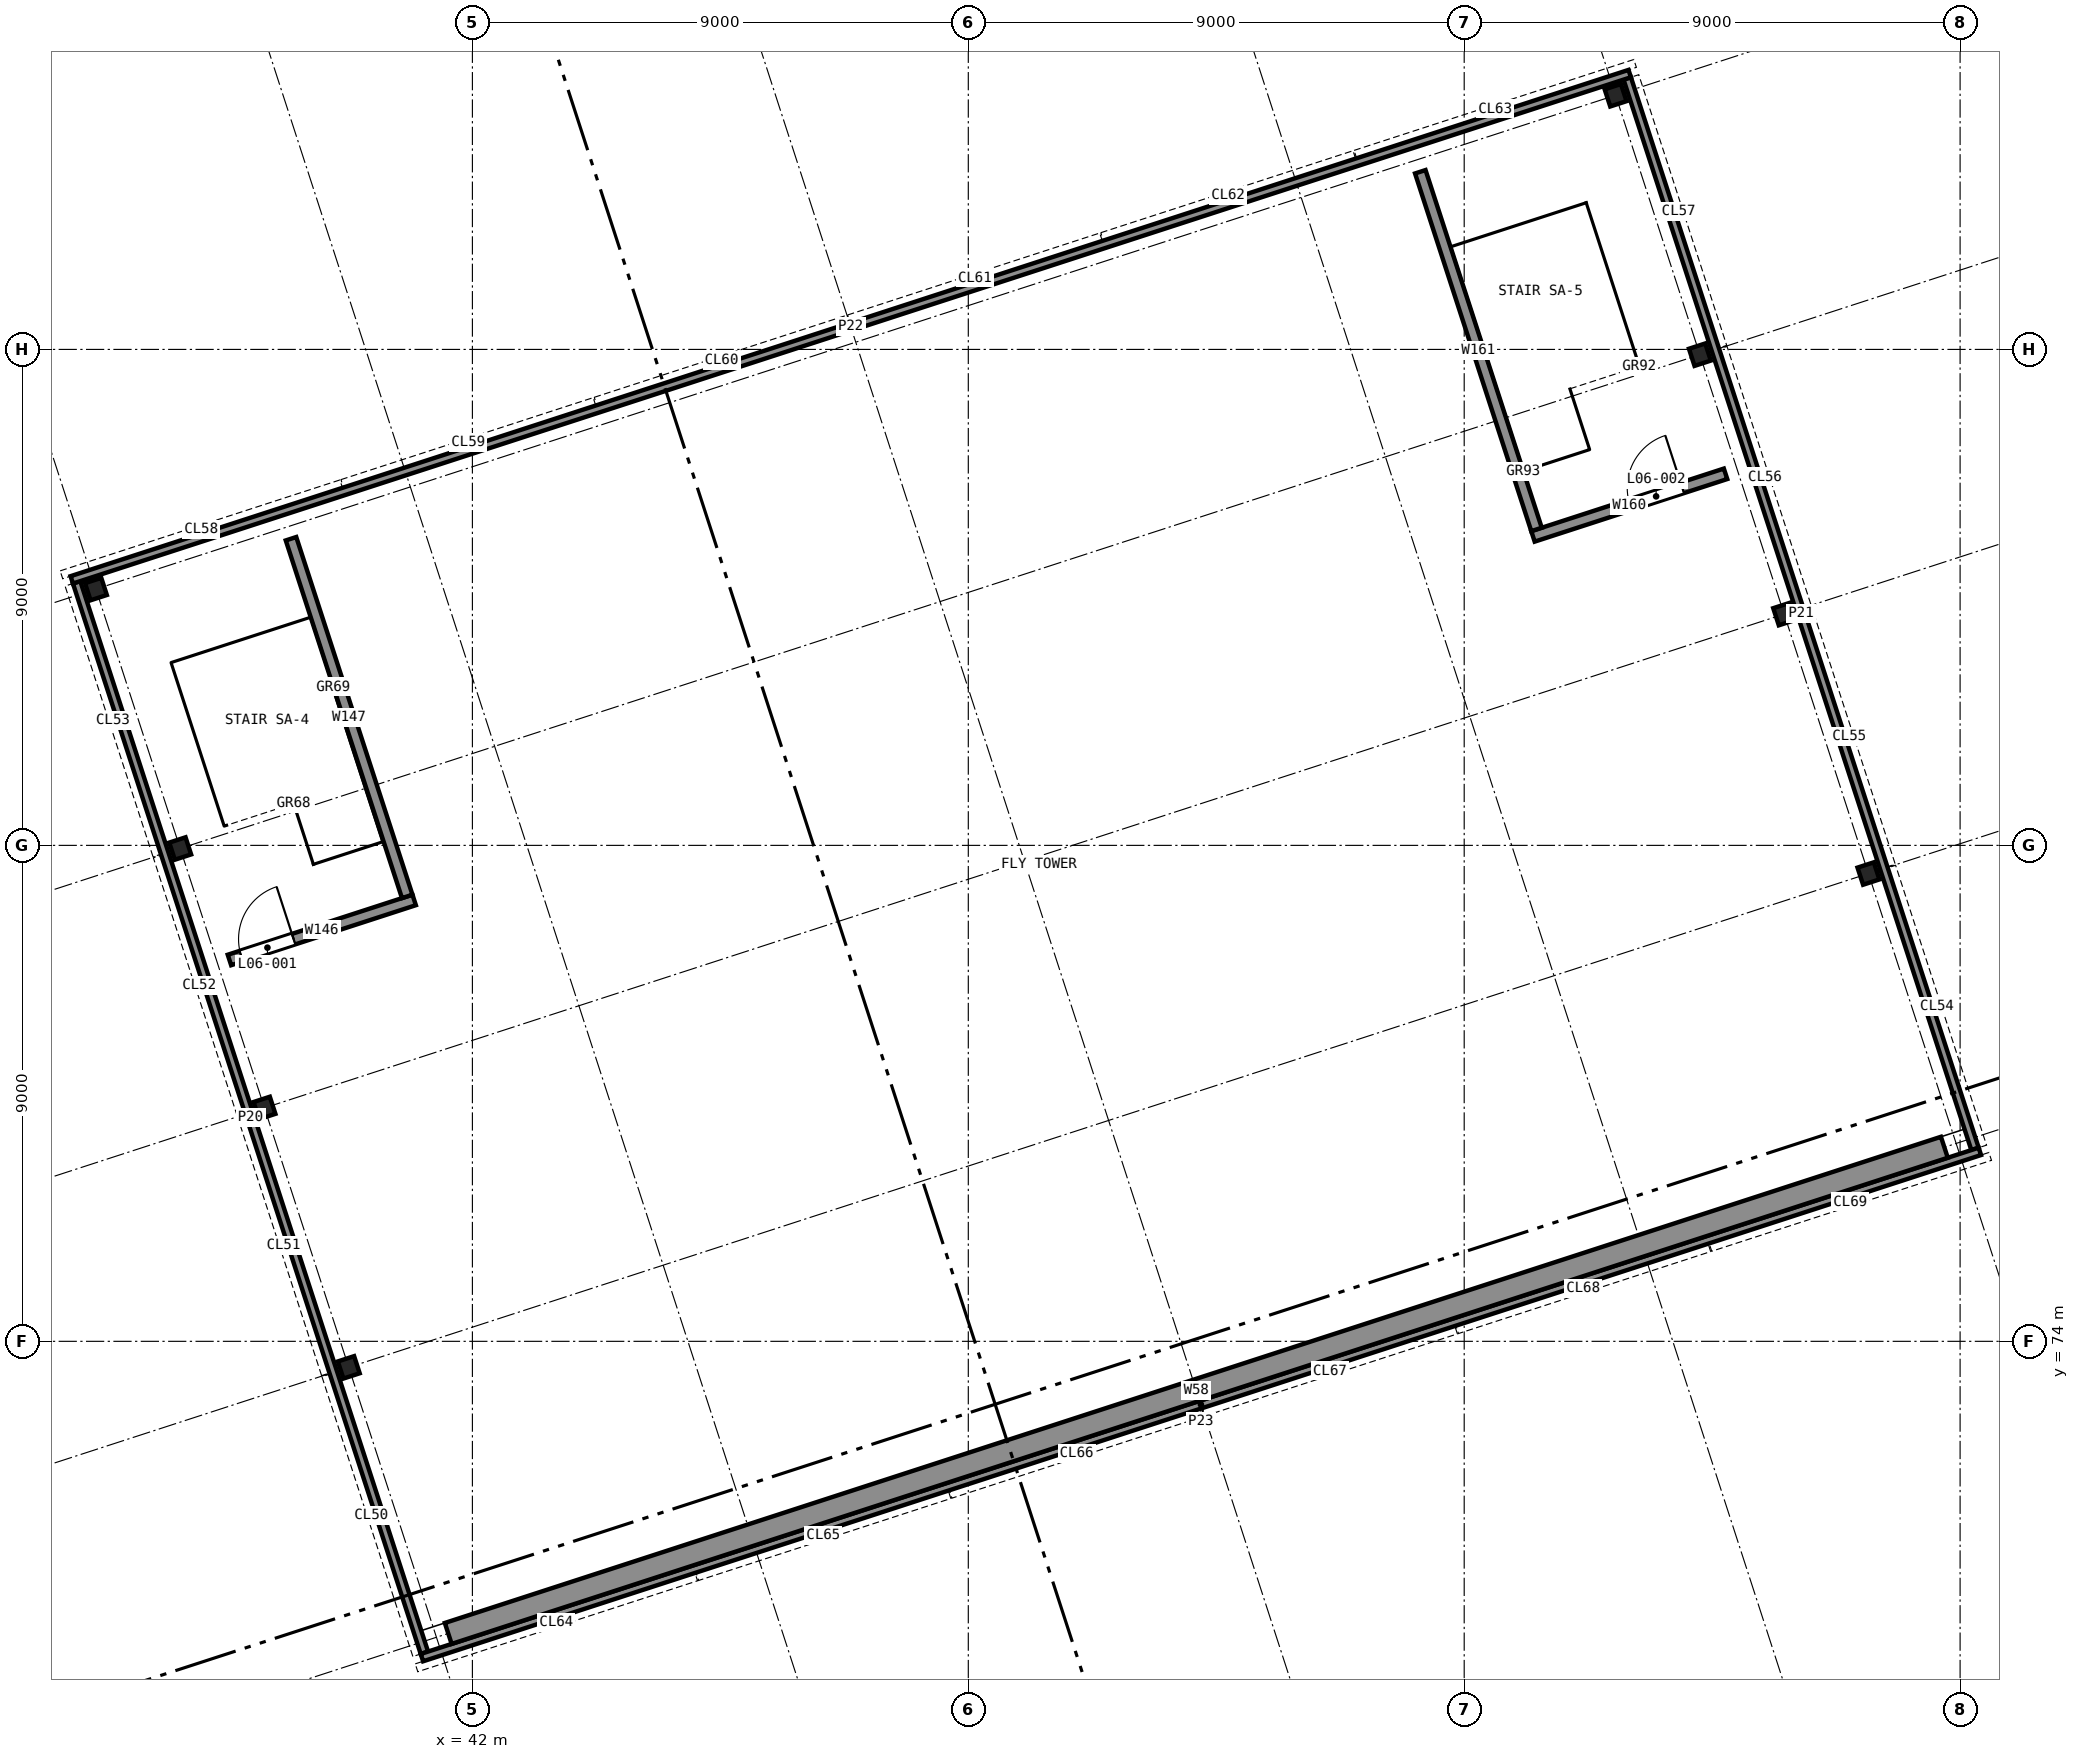
"""IFC4 building model, lengths in metres.
Left out: names, types, materials, properties, quantities, classifications, styles, units other than length and angle.
Written with IfcOpenShell. Run it as: python <this file> out.ifc"""

import sys

from ifc_helpers import new_model, si_unit, direction, frame, frame_2d, origin, origin_2d, place, context, subcontext, project, spatial, rectangle, i_section, extrude, element, fill, save


model = new_model("IFC4")
c1 = context("Model", 3, precision=1e-05, world=origin(), true_north=direction((0.0, 1.0)))
c2 = subcontext(c1, "Body", "Model", "MODEL_VIEW")
j1 = project(units=[si_unit("LENGTHUNIT", "METRE"), si_unit("PLANEANGLEUNIT", "RADIAN")], contexts=[c1])
p1 = place(None, origin())
s1 = spatial("IfcSite", under=j1, at=p1, CompositionType="ELEMENT")
p2 = place(p1, origin())
s2 = spatial("IfcBuilding", under=s1, at=p2, CompositionType="ELEMENT")
p3 = place(p2, frame((0.0, 0.0, 25.5)))
s3 = spatial("IfcBuildingStorey", under=s2, at=p3, CompositionType="ELEMENT", Elevation=25.5)
p4 = place(p3, frame((41.562, 68.699, 0.0), z_axis=(0.0, 0.0, 1.0), x_axis=(0.951058008754, 0.309012401021, 0.0)))
e1 = element("IfcWall", 1, at=p4, inside=s3, PredefinedType="SHEAR", context=c2, shape_type="SweptSolid", body=[
    extrude(rectangle(XDim=28.55, YDim=0.4, at=frame_2d((14.275, 0.0))), origin(), (0.0, 0.0, 1.0), 4.0),
])
p5 = place(p3, frame((37.591, 80.92, 0.0), z_axis=(0.0, 0.0, 1.0), x_axis=(0.951052389726, 0.30902969436, 0.0)))
e2 = element("IfcWall", 2, at=p5, inside=s3, PredefinedType="SOLIDWALL", context=c2, shape_type="SweptSolid", body=[
    extrude(rectangle(XDim=3.525, YDim=0.2, at=frame_2d((1.763, 0.0))), origin(), (0.0, 0.0, 1.0), 4.0),
])
p6 = place(p5, frame((0.225, 0.0, 0.0)))
e3 = element("IfcOpeningElement", 3, at=p6, cuts=e2, PredefinedType="OPENING", context=c2, shape_type="SweptSolid", body=[
    extrude(rectangle(XDim=1.0, YDim=2.1, at=frame_2d((0.5, 1.05))), frame((0.0, 0.11, 0.0), z_axis=(0.0, -1.0, 0.0), x_axis=(1.0, 0.0, 0.0)), (0.0, 0.0, 1.0), 0.22),
])
p7 = place(p3, frame((40.817, 82.074, 0.0), z_axis=(0.0, 0.0, 1.0), x_axis=(-0.309028643499, 0.951052731186, 0.0)))
e4 = element("IfcWall", 4, at=p7, inside=s3, PredefinedType="SOLIDWALL", context=c2, shape_type="SweptSolid", body=[
    extrude(rectangle(XDim=6.825, YDim=0.2, at=frame_2d((3.413, 0.0))), origin(), (0.0, 0.0, 1.0), 4.0),
])
p8 = place(p3, frame((64.743, 89.743, 0.0), z_axis=(0.0, 0.0, 1.0), x_axis=(-0.95104773735, -0.309044011885, 0.0)))
e5 = element("IfcWall", 5, at=p8, inside=s3, PredefinedType="SOLIDWALL", context=c2, shape_type="SweptSolid", body=[
    extrude(rectangle(XDim=3.675, YDim=0.2, at=frame_2d((1.837, 0.0))), origin(), (0.0, 0.0, 1.0), 4.0),
])
p9 = place(p8, frame((0.825, 0.0, 0.0)))
e6 = element("IfcOpeningElement", 6, at=p9, cuts=e5, PredefinedType="OPENING", context=c2, shape_type="SweptSolid", body=[
    extrude(rectangle(XDim=1.0, YDim=2.1, at=frame_2d((0.5, 1.05))), frame((0.0, 0.11, 0.0), z_axis=(0.0, -1.0, 0.0), x_axis=(1.0, 0.0, 0.0)), (0.0, 0.0, 1.0), 0.22),
])
p10 = place(p3, frame((61.312, 88.733, 0.0), z_axis=(0.0, 0.0, 1.0), x_axis=(-0.309028643499, 0.951052731186, 0.0)))
e7 = element("IfcWall", 7, at=p10, inside=s3, PredefinedType="SOLIDWALL", context=c2, shape_type="SweptSolid", body=[
    extrude(rectangle(XDim=6.825, YDim=0.2, at=frame_2d((3.413, 0.0))), origin(), (0.0, 0.0, 1.0), 4.0),
])
for number, where, z_axis, x_axis in (
    (8, (39.756, 73.528, 0.0), (0.0, 0.0, 1.0), (0.951, 0.309, 0.0)),
    (9, (67.337, 82.489, 0.0), (0.0, 0.0, 1.0), (0.951, 0.309, 0.0)),
    (10, (38.227, 78.235, 0.0), (0.0, 0.0, 1.0), (0.951, 0.309, 0.0)),
    (11, (65.807, 87.197, 0.0), (0.0, 0.0, 1.0), (0.951, 0.309, 0.0)),
    (12, (36.697, 82.943, 0.0), (0.0, 0.0, 1.0), (0.951, 0.309, 0.0)),
    (13, (64.277, 91.905, 0.0), (0.0, 0.0, 1.0), (0.951, 0.309, 0.0)),
    (14, (35.167, 87.651, 0.0), (0.0, 0.0, 1.0), (0.951, 0.309, 0.0)),
    (15, (62.748, 96.612, 0.0), (0.0, 0.0, 1.0), (0.951, 0.309, 0.0)),
):
    element("IfcColumn", number, at=place(p3, frame(where, z_axis=z_axis, x_axis=x_axis)), inside=s3, PredefinedType="COLUMN", context=c2, shape_type="SweptSolid", body=[
        extrude(i_section(OverallWidth=0.311, OverallDepth=0.327, WebThickness=0.016, FlangeThickness=0.025, FilletRadius=0.017, at=origin_2d()), origin(), (0.0, 0.0, 1.0), 4.0),
    ])
p11 = place(p3, frame((41.129, 68.348, 0.0), z_axis=(0.0, 0.0, 1.0), x_axis=(-0.309010933888, 0.951058485445, 0.0)))
e16 = element("IfcWall", 16, at=p11, inside=s3, PredefinedType="SOLIDWALL", context=c2, shape_type="SweptSolid", body=[
    extrude(rectangle(XDim=20.425, YDim=0.14, at=frame_2d((10.212, 0.0))), origin(), (0.0, 0.0, 1.0), 4.0),
])
p12 = place(p3, frame((69.271, 77.492, 0.0), z_axis=(0.0, 0.0, 1.0), x_axis=(-0.309021745532, 0.951054972537, 0.0)))
e17 = element("IfcWall", 17, at=p12, inside=s3, PredefinedType="SOLIDWALL", context=c2, shape_type="SweptSolid", body=[
    extrude(rectangle(XDim=20.425, YDim=0.14, at=frame_2d((10.212, 0.0))), origin(), (0.0, 0.0, 1.0), 4.0),
])
for number, where, z_axis, x_axis in (
    (18, (34.729, 87.819, 0.0), (0.0, 0.0, 1.0), (0.951, 0.309, 0.0)),
    (19, (41.084, 68.26, 0.0), (0.0, 0.0, 1.0), (0.951, 0.309, 0.0)),
):
    element("IfcWall", number, at=place(p3, frame(where, z_axis=z_axis, x_axis=x_axis)), inside=s3, PredefinedType="SOLIDWALL", context=c2, shape_type="SweptSolid", body=[
        extrude(rectangle(XDim=29.73, YDim=0.14, at=frame_2d((14.865, 0.0))), origin(), (0.0, 0.0, 1.0), 4.0),
    ])
p13 = place(p6, origin())
e20 = element("IfcDoor", 20, at=p13, inside=s3, OperationType="SINGLE_SWING_LEFT", PredefinedType="DOOR", context=c2, shape_type="SweptSolid", body=[
    extrude(rectangle(XDim=1.0, YDim=2.1, at=frame_2d((0.5, 1.05))), frame((0.0, 0.025, 0.0), z_axis=(0.0, -1.0, 0.0), x_axis=(1.0, 0.0, 0.0)), (0.0, 0.0, 1.0), 0.05),
])
fill(e3, e20)
p14 = place(p9, frame((1.0, 0.0, 0.0), z_axis=(0.0, 0.0, 1.0), x_axis=(-1.0, 0.0, 0.0)))
e21 = element("IfcDoor", 21, at=p14, inside=s3, OperationType="SINGLE_SWING_LEFT", PredefinedType="DOOR", context=c2, shape_type="SweptSolid", body=[
    extrude(rectangle(XDim=1.0, YDim=2.1, at=frame_2d((0.5, 1.05))), frame((0.0, 0.025, 0.0), z_axis=(0.0, -1.0, 0.0), x_axis=(1.0, 0.0, 0.0)), (0.0, 0.0, 1.0), 0.05),
])
fill(e6, e21)
save(model, sys.argv[1])
